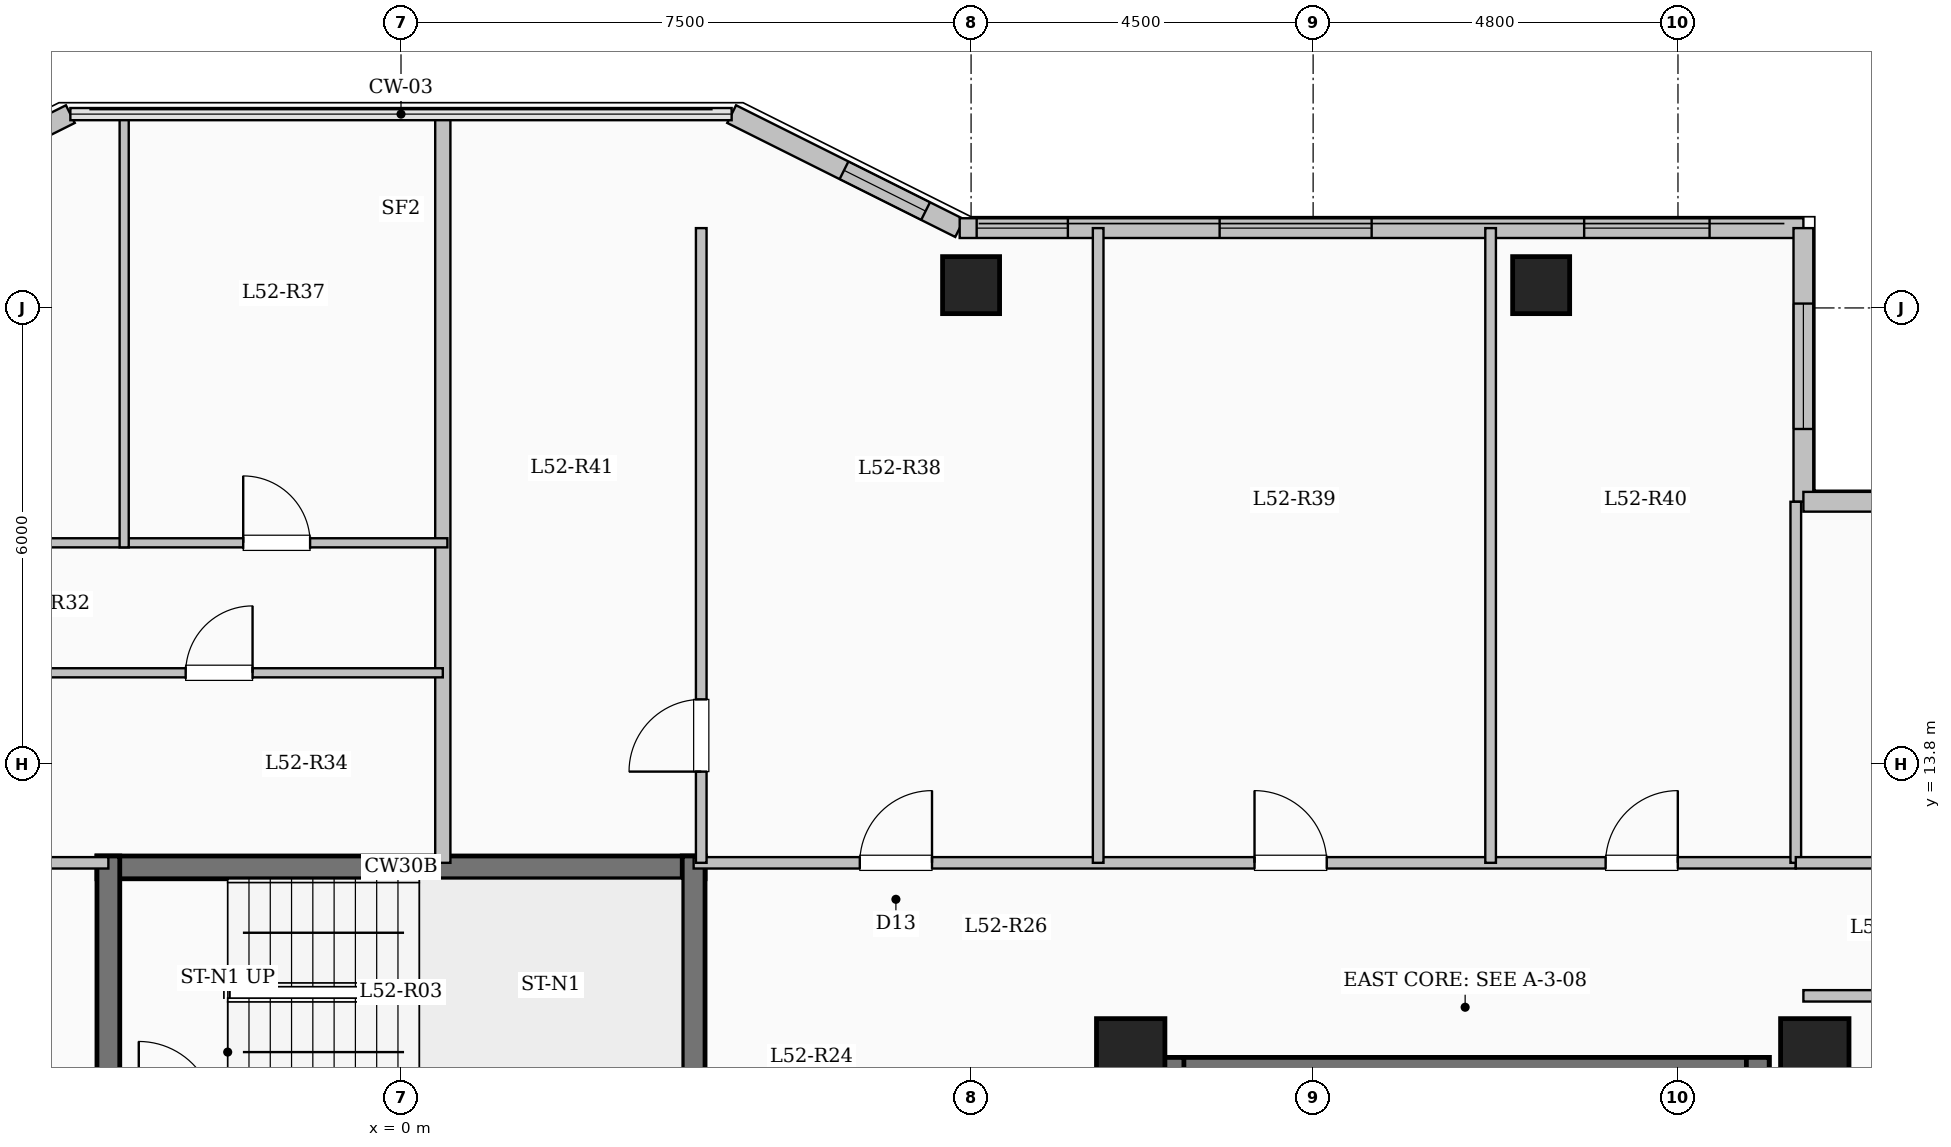
"""IFC4 building model, lengths in metres.
Left out: names, types, materials, properties, quantities, classifications, styles, units other than length and angle.
Written with IfcOpenShell. Run it as: python <this file> out.ifc"""

import sys

from ifc_helpers import new_model, si_unit, direction, frame, frame_2d, origin, origin_2d, place, context, subcontext, project, spatial, rectangle, extrude, element, fill, save


model = new_model("IFC4")
c1 = context("Model", 3, precision=1e-05, world=origin(), true_north=direction((0.0, 1.0)))
c2 = subcontext(c1, "Body", "Model", "MODEL_VIEW")
j1 = project(units=[si_unit("LENGTHUNIT", "METRE"), si_unit("PLANEANGLEUNIT", "RADIAN")], contexts=[c1])
p1 = place(None, origin())
s1 = spatial("IfcSite", under=j1, at=p1, CompositionType="ELEMENT")
p2 = place(p1, origin())
s2 = spatial("IfcBuilding", under=s1, at=p2, CompositionType="ELEMENT")
p3 = place(p2, frame((0.0, 0.0, 193.6)))
s3 = spatial("IfcBuildingStorey", under=s2, at=p3, CompositionType="ELEMENT", Elevation=193.6)
for number, where, z_axis, x_axis in (
    (1, (9.6, 10.0, 0.0), (0.0, 0.0, 1.0), (1.0, 0.0, 0.0)),
    (2, (18.6, 10.0, 0.0), (0.0, 0.0, 1.0), (1.0, 0.0, 0.0)),
):
    element("IfcColumn", number, at=place(p3, frame(where, z_axis=z_axis, x_axis=x_axis)), inside=s3, PredefinedType="COLUMN", context=c2, shape_type="SweptSolid", body=[
        extrude(rectangle(XDim=0.9, YDim=0.9, at=origin_2d()), origin(), (0.0, 0.0, 1.0), 3.35),
    ])
for number, where, z_axis, x_axis in (
    (3, (7.5, 20.1, 0.0), (0.0, 0.0, 1.0), (1.0, 0.0, 0.0)),
    (4, (15.0, 20.1, 0.0), (0.0, 0.0, 1.0), (1.0, 0.0, 0.0)),
):
    element("IfcColumn", number, at=place(p3, frame(where, z_axis=z_axis, x_axis=x_axis)), inside=s3, PredefinedType="COLUMN", context=c2, shape_type="SweptSolid", body=[
        extrude(rectangle(XDim=0.75, YDim=0.75, at=origin_2d()), origin(), (0.0, 0.0, 1.0), 3.35),
    ])
p4 = place(p3, frame((-7.35, 20.85, 0.0), z_axis=(0.0, 0.0, 1.0), x_axis=(0.894427191, 0.4472135955, 0.0)))
e5 = element("IfcWall", 5, at=p4, inside=s3, PredefinedType="SOLIDWALL", context=c2, shape_type="SweptSolid", body=[
    extrude(rectangle(XDim=3.354, YDim=0.26, at=frame_2d((1.677, 0.0))), origin(), (0.0, 0.0, 1.0), 3.1),
])
p5 = place(p4, frame((0.852, 0.0, 0.9)))
e6 = element("IfcOpeningElement", 6, at=p5, cuts=e5, PredefinedType="OPENING", context=c2, shape_type="SweptSolid", body=[
    extrude(rectangle(XDim=1.65, YDim=1.6, at=frame_2d((0.825, 0.8))), frame((0.0, 0.14, 0.0), z_axis=(0.0, -1.0, 0.0), x_axis=(1.0, 0.0, 0.0)), (0.0, 0.0, 1.0), 0.28),
])
p6 = place(p3, frame((4.35, 22.35, 0.0), z_axis=(0.0, 0.0, 1.0), x_axis=(0.894427191, -0.4472135955, 0.0)))
e7 = element("IfcWall", 7, at=p6, inside=s3, PredefinedType="SOLIDWALL", context=c2, shape_type="SweptSolid", body=[
    extrude(rectangle(XDim=3.354, YDim=0.26, at=frame_2d((1.677, 0.0))), origin(), (0.0, 0.0, 1.0), 3.1),
])
p7 = place(p6, frame((1.653, 0.0, 0.95)))
e8 = element("IfcOpeningElement", 8, at=p7, cuts=e7, PredefinedType="OPENING", context=c2, shape_type="SweptSolid", body=[
    extrude(rectangle(XDim=1.2, YDim=1.5, at=frame_2d((0.6, 0.75))), frame((0.0, 0.14, 0.0), z_axis=(0.0, -1.0, 0.0), x_axis=(1.0, 0.0, 0.0)), (0.0, 0.0, 1.0), 0.28),
])
p8 = place(p3, frame((7.35, 20.85, 0.0), z_axis=(0.0, 0.0, 1.0), x_axis=(1.0, 0.0, 0.0)))
e9 = element("IfcWall", 9, at=p8, inside=s3, PredefinedType="SOLIDWALL", context=c2, shape_type="SweptSolid", body=[
    extrude(rectangle(XDim=11.1, YDim=0.26, at=frame_2d((5.55, 0.0))), origin(), (0.0, 0.0, 1.0), 3.1),
])
p9 = place(p8, frame((0.223, 0.0, 0.95)))
e10 = element("IfcOpeningElement", 10, at=p9, cuts=e9, PredefinedType="OPENING", context=c2, shape_type="SweptSolid", body=[
    extrude(rectangle(XDim=1.2, YDim=1.5, at=frame_2d((0.6, 0.75))), frame((0.0, 0.14, 0.0), z_axis=(0.0, -1.0, 0.0), x_axis=(1.0, 0.0, 0.0)), (0.0, 0.0, 1.0), 0.28),
])
p10 = place(p8, frame((3.42, 0.0, 0.9)))
e11 = element("IfcOpeningElement", 11, at=p10, cuts=e9, PredefinedType="OPENING", context=c2, shape_type="SweptSolid", body=[
    extrude(rectangle(XDim=2.0, YDim=1.7, at=frame_2d((1.0, 0.85))), frame((0.0, 0.14, 0.0), z_axis=(0.0, -1.0, 0.0), x_axis=(1.0, 0.0, 0.0)), (0.0, 0.0, 1.0), 0.28),
])
p11 = place(p8, frame((8.216, 0.0, 0.9)))
e12 = element("IfcOpeningElement", 12, at=p11, cuts=e9, PredefinedType="OPENING", context=c2, shape_type="SweptSolid", body=[
    extrude(rectangle(XDim=1.65, YDim=1.6, at=frame_2d((0.825, 0.8))), frame((0.0, 0.14, 0.0), z_axis=(0.0, -1.0, 0.0), x_axis=(1.0, 0.0, 0.0)), (0.0, 0.0, 1.0), 0.28),
])
p12 = place(p3, frame((18.45, 20.85, 0.0), z_axis=(0.0, 0.0, 1.0), x_axis=(0.0, -1.0, 0.0)))
e13 = element("IfcWall", 13, at=p12, inside=s3, PredefinedType="SOLIDWALL", context=c2, shape_type="SweptSolid", body=[
    extrude(rectangle(XDim=3.6, YDim=0.26, at=frame_2d((1.8, 0.0))), origin(), (0.0, 0.0, 1.0), 3.1),
])
p13 = place(p12, frame((0.992, 0.0, 0.9)))
e14 = element("IfcOpeningElement", 14, at=p13, cuts=e13, PredefinedType="OPENING", context=c2, shape_type="SweptSolid", body=[
    extrude(rectangle(XDim=1.65, YDim=1.6, at=frame_2d((0.825, 0.8))), frame((0.0, 0.14, 0.0), z_axis=(0.0, -1.0, 0.0), x_axis=(1.0, 0.0, 0.0)), (0.0, 0.0, 1.0), 0.28),
])
p14 = place(p3, frame((18.45, 17.25, 0.0), z_axis=(0.0, 0.0, 1.0), x_axis=(1.0, 0.0, 0.0)))
e15 = element("IfcWall", 15, at=p14, inside=s3, PredefinedType="SOLIDWALL", context=c2, shape_type="SweptSolid", body=[
    extrude(rectangle(XDim=5.1, YDim=0.26, at=frame_2d((2.55, 0.0))), origin(), (0.0, 0.0, 1.0), 3.1),
])
p15 = place(p14, frame((1.525, 0.0, 0.9)))
e16 = element("IfcOpeningElement", 16, at=p15, cuts=e15, PredefinedType="OPENING", context=c2, shape_type="SweptSolid", body=[
    extrude(rectangle(XDim=2.0, YDim=1.7, at=frame_2d((1.0, 0.85))), frame((0.0, 0.14, 0.0), z_axis=(0.0, -1.0, 0.0), x_axis=(1.0, 0.0, 0.0)), (0.0, 0.0, 1.0), 0.28),
])
p16 = place(p3, frame((10.0, 9.79, 0.0), z_axis=(0.0, 0.0, 1.0), x_axis=(1.0, 0.0, 0.0)))
e17 = element("IfcWall", 17, at=p16, inside=s3, PredefinedType="SHEAR", context=c2, shape_type="SweptSolid", body=[
    extrude(rectangle(XDim=8.0, YDim=0.3, at=frame_2d((4.0, 0.0))), origin(), (0.0, 0.0, 1.0), 3.35),
])
for number, where, z_axis, x_axis in (
    (18, (10.15, 6.35, 0.0), (0.0, 0.0, 1.0), (0.0, 1.0, 0.0)),
    (19, (17.85, 6.35, 0.0), (0.0, 0.0, 1.0), (0.0, 1.0, 0.0)),
):
    element("IfcWall", number, at=place(p3, frame(where, z_axis=z_axis, x_axis=x_axis)), inside=s3, PredefinedType="SHEAR", context=c2, shape_type="SweptSolid", body=[
        extrude(rectangle(XDim=3.59, YDim=0.3, at=frame_2d((1.795, 0.0))), origin(), (0.0, 0.0, 1.0), 3.35),
    ])
p17 = place(p3, frame((-4.0, 12.44, 0.0), z_axis=(0.0, 0.0, 1.0), x_axis=(1.0, 0.0, 0.0)))
e20 = element("IfcWall", 20, at=p17, inside=s3, PredefinedType="SHEAR", context=c2, shape_type="SweptSolid", body=[
    extrude(rectangle(XDim=8.0, YDim=0.3, at=frame_2d((4.0, 0.0))), origin(), (0.0, 0.0, 1.0), 3.35),
])
for number, where, z_axis, x_axis in (
    (21, (-3.85, 9.0, 0.0), (0.0, 0.0, 1.0), (0.0, 1.0, 0.0)),
    (22, (3.85, 9.0, 0.0), (0.0, 0.0, 1.0), (0.0, 1.0, 0.0)),
):
    element("IfcWall", number, at=place(p3, frame(where, z_axis=z_axis, x_axis=x_axis)), inside=s3, PredefinedType="SHEAR", context=c2, shape_type="SweptSolid", body=[
        extrude(rectangle(XDim=3.59, YDim=0.3, at=frame_2d((1.795, 0.0))), origin(), (0.0, 0.0, 1.0), 3.35),
    ])
p18 = place(p3, frame((-18.35, 12.5, 0.0), z_axis=(0.0, 0.0, 1.0), x_axis=(1.0, 0.0, 0.0)))
e23 = element("IfcWall", 23, at=p18, inside=s3, PredefinedType="PARTITIONING", context=c2, shape_type="SweptSolid", body=[
    extrude(rectangle(XDim=14.5, YDim=0.15, at=frame_2d((7.25, 0.0))), origin(), (0.0, 0.0, 1.0), 3.1),
])
p19 = place(p18, frame((0.7, 0.0, 0.0)))
e24 = element("IfcOpeningElement", 24, at=p19, cuts=e23, PredefinedType="OPENING", context=c2, shape_type="SweptSolid", body=[
    extrude(rectangle(XDim=0.96, YDim=2.15, at=frame_2d((0.48, 1.075))), frame((0.0, 0.085, 0.0), z_axis=(0.0, -1.0, 0.0), x_axis=(1.0, 0.0, 0.0)), (0.0, 0.0, 1.0), 0.17),
])
p20 = place(p3, frame((3.85, 12.5, 0.0), z_axis=(0.0, 0.0, 1.0), x_axis=(1.0, 0.0, 0.0)))
e25 = element("IfcWall", 25, at=p20, inside=s3, PredefinedType="PARTITIONING", context=c2, shape_type="SweptSolid", body=[
    extrude(rectangle(XDim=14.5, YDim=0.15, at=frame_2d((7.25, 0.0))), origin(), (0.0, 0.0, 1.0), 3.1),
])
p21 = place(p20, frame((2.186, 0.0, 0.0)))
e26 = element("IfcOpeningElement", 26, at=p21, cuts=e25, PredefinedType="OPENING", context=c2, shape_type="SweptSolid", body=[
    extrude(rectangle(XDim=0.95, YDim=2.15, at=frame_2d((0.475, 1.075))), frame((0.0, 0.085, 0.0), z_axis=(0.0, -1.0, 0.0), x_axis=(1.0, 0.0, 0.0)), (0.0, 0.0, 1.0), 0.17),
])
p22 = place(p20, frame((7.379, 0.0, 0.0)))
e27 = element("IfcOpeningElement", 27, at=p22, cuts=e25, PredefinedType="OPENING", context=c2, shape_type="SweptSolid", body=[
    extrude(rectangle(XDim=0.95, YDim=2.15, at=frame_2d((0.475, 1.075))), frame((0.0, 0.085, 0.0), z_axis=(0.0, -1.0, 0.0), x_axis=(1.0, 0.0, 0.0)), (0.0, 0.0, 1.0), 0.17),
])
p23 = place(p20, frame((11.998, 0.0, 0.0)))
e28 = element("IfcOpeningElement", 28, at=p23, cuts=e25, PredefinedType="OPENING", context=c2, shape_type="SweptSolid", body=[
    extrude(rectangle(XDim=0.95, YDim=2.15, at=frame_2d((0.475, 1.075))), frame((0.0, 0.085, 0.0), z_axis=(0.0, -1.0, 0.0), x_axis=(1.0, 0.0, 0.0)), (0.0, 0.0, 1.0), 0.17),
])
p24 = place(p3, frame((0.55, 12.5, 0.0), z_axis=(0.0, 0.0, 1.0), x_axis=(0.0, 1.0, 0.0)))
e29 = element("IfcWall", 29, at=p24, inside=s3, PredefinedType="SOLIDWALL", context=c2, shape_type="SweptSolid", body=[
    extrude(rectangle(XDim=9.88, YDim=0.2, at=frame_2d((4.94, 0.0))), origin(), (0.0, 0.0, 1.0), 3.1),
])
p25 = place(p3, frame((-5.336, 15.0, 0.0), z_axis=(0.0, 0.0, 1.0), x_axis=(1.0, 0.0, 0.0)))
e30 = element("IfcWall", 30, at=p25, inside=s3, PredefinedType="PARTITIONING", context=c2, shape_type="SweptSolid", body=[
    extrude(rectangle(XDim=5.886, YDim=0.12, at=frame_2d((2.943, 0.0))), origin(), (0.0, 0.0, 1.0), 3.1),
])
p26 = place(p25, frame((2.503, 0.0, 0.0)))
e31 = element("IfcOpeningElement", 31, at=p26, cuts=e30, PredefinedType="OPENING", context=c2, shape_type="SweptSolid", body=[
    extrude(rectangle(XDim=0.88, YDim=2.1, at=frame_2d((0.44, 1.05))), frame((0.0, 0.07, 0.0), z_axis=(0.0, -1.0, 0.0), x_axis=(1.0, 0.0, 0.0)), (0.0, 0.0, 1.0), 0.14),
])
p27 = place(p3, frame((-11.965, 16.71, 0.0), z_axis=(0.0, 0.0, 1.0), x_axis=(1.0, 0.0, 0.0)))
e32 = element("IfcWall", 32, at=p27, inside=s3, PredefinedType="PARTITIONING", context=c2, shape_type="SweptSolid", body=[
    extrude(rectangle(XDim=12.575, YDim=0.12, at=frame_2d((6.288, 0.0))), origin(), (0.0, 0.0, 1.0), 2.725),
])
p28 = place(p27, frame((1.626, 0.0, 0.0)))
e33 = element("IfcOpeningElement", 33, at=p28, cuts=e32, PredefinedType="OPENING", context=c2, shape_type="SweptSolid", body=[
    extrude(rectangle(XDim=0.88, YDim=2.1, at=frame_2d((0.44, 1.05))), frame((0.0, 0.07, 0.0), z_axis=(0.0, -1.0, 0.0), x_axis=(1.0, 0.0, 0.0)), (0.0, 0.0, 1.0), 0.14),
])
p29 = place(p27, frame((5.758, 0.0, 0.0)))
e34 = element("IfcOpeningElement", 34, at=p29, cuts=e32, PredefinedType="OPENING", context=c2, shape_type="SweptSolid", body=[
    extrude(rectangle(XDim=0.88, YDim=2.1, at=frame_2d((0.44, 1.05))), frame((0.0, 0.07, 0.0), z_axis=(0.0, -1.0, 0.0), x_axis=(1.0, 0.0, 0.0)), (0.0, 0.0, 1.0), 0.14),
])
p30 = place(p27, frame((9.889, 0.0, 0.0)))
e35 = element("IfcOpeningElement", 35, at=p30, cuts=e32, PredefinedType="OPENING", context=c2, shape_type="SweptSolid", body=[
    extrude(rectangle(XDim=0.88, YDim=2.1, at=frame_2d((0.44, 1.05))), frame((0.0, 0.07, 0.0), z_axis=(0.0, -1.0, 0.0), x_axis=(1.0, 0.0, 0.0)), (0.0, 0.0, 1.0), 0.14),
])
p31 = place(p3, frame((-3.642, 16.65, 0.0), z_axis=(0.0, 0.0, 1.0), x_axis=(0.0, 1.0, 0.0)))
e36 = element("IfcWall", 36, at=p31, inside=s3, PredefinedType="PARTITIONING", context=c2, shape_type="SweptSolid", body=[
    extrude(rectangle(XDim=5.73, YDim=0.12, at=frame_2d((2.865, 0.0))), origin(), (0.0, 0.0, 1.0), 3.1),
])
p32 = place(p3, frame((3.95, 12.5, 0.0), z_axis=(0.0, 0.0, 1.0), x_axis=(0.0, 1.0, 0.0)))
e37 = element("IfcWall", 37, at=p32, inside=s3, PredefinedType="PARTITIONING", context=c2, shape_type="SweptSolid", body=[
    extrude(rectangle(XDim=8.35, YDim=0.14, at=frame_2d((4.175, 0.0))), origin(), (0.0, 0.0, 1.0), 3.1),
])
p33 = place(p32, frame((1.2, 0.0, 0.0)))
e38 = element("IfcOpeningElement", 38, at=p33, cuts=e37, PredefinedType="OPENING", context=c2, shape_type="SweptSolid", body=[
    extrude(rectangle(XDim=0.95, YDim=2.15, at=frame_2d((0.475, 1.075))), frame((0.0, 0.08, 0.0), z_axis=(0.0, -1.0, 0.0), x_axis=(1.0, 0.0, 0.0)), (0.0, 0.0, 1.0), 0.16),
])
for number, where, z_axis, x_axis in (
    (39, (9.172, 12.5, 0.0), (0.0, 0.0, 1.0), (0.0, 1.0, 0.0)),
    (40, (14.335, 12.5, 0.0), (0.0, 0.0, 1.0), (0.0, 1.0, 0.0)),
):
    element("IfcWall", number, at=place(p3, frame(where, z_axis=z_axis, x_axis=x_axis)), inside=s3, PredefinedType="PARTITIONING", context=c2, shape_type="SweptSolid", body=[
        extrude(rectangle(XDim=8.35, YDim=0.14, at=frame_2d((4.175, 0.0))), origin(), (0.0, 0.0, 1.0), 3.1),
    ])
p34 = place(p3, frame((18.45, 10.75, 0.0), z_axis=(0.0, 0.0, 1.0), x_axis=(1.0, 0.0, 0.0)))
e41 = element("IfcWall", 41, at=p34, inside=s3, PredefinedType="PARTITIONING", context=c2, shape_type="SweptSolid", body=[
    extrude(rectangle(XDim=5.13, YDim=0.15, at=frame_2d((2.565, 0.0))), origin(), (0.0, 0.0, 1.0), 3.1),
])
p35 = place(p3, frame((18.35, 12.5, 0.0), z_axis=(0.0, 0.0, 1.0), x_axis=(0.0, 1.0, 0.0)))
e42 = element("IfcWall", 42, at=p35, inside=s3, PredefinedType="PARTITIONING", context=c2, shape_type="SweptSolid", body=[
    extrude(rectangle(XDim=4.75, YDim=0.14, at=frame_2d((2.375, 0.0))), origin(), (0.0, 0.0, 1.0), 3.1),
])
p36 = place(p3, frame((18.35, 12.5, 0.0), z_axis=(0.0, 0.0, 1.0), x_axis=(1.0, 0.0, 0.0)))
e43 = element("IfcWall", 43, at=p36, inside=s3, PredefinedType="PARTITIONING", context=c2, shape_type="SweptSolid", body=[
    extrude(rectangle(XDim=5.23, YDim=0.15, at=frame_2d((2.615, 0.0))), origin(), (0.0, 0.0, 1.0), 3.1),
])
p37 = place(p36, frame((2.14, 0.0, 0.0)))
e44 = element("IfcOpeningElement", 44, at=p37, cuts=e43, PredefinedType="OPENING", context=c2, shape_type="SweptSolid", body=[
    extrude(rectangle(XDim=0.95, YDim=2.15, at=frame_2d((0.475, 1.075))), frame((0.0, 0.085, 0.0), z_axis=(0.0, -1.0, 0.0), x_axis=(1.0, 0.0, 0.0)), (0.0, 0.0, 1.0), 0.17),
])
p38 = place(p7, origin())
e45 = element("IfcWindow", 45, at=p38, inside=s3, PartitioningType="SINGLE_PANEL", PredefinedType="WINDOW", context=c2, shape_type="SweptSolid", body=[
    extrude(rectangle(XDim=1.2, YDim=1.5, at=frame_2d((0.6, 0.75))), frame((0.0, 0.03, 0.0), z_axis=(0.0, -1.0, 0.0), x_axis=(1.0, 0.0, 0.0)), (0.0, 0.0, 1.0), 0.06),
])
fill(e8, e45)
p39 = place(p9, origin())
e46 = element("IfcWindow", 46, at=p39, inside=s3, PartitioningType="SINGLE_PANEL", PredefinedType="WINDOW", context=c2, shape_type="SweptSolid", body=[
    extrude(rectangle(XDim=1.2, YDim=1.5, at=frame_2d((0.6, 0.75))), frame((0.0, 0.03, 0.0), z_axis=(0.0, -1.0, 0.0), x_axis=(1.0, 0.0, 0.0)), (0.0, 0.0, 1.0), 0.06),
])
fill(e10, e46)
p40 = place(p10, origin())
e47 = element("IfcWindow", 47, at=p40, inside=s3, PartitioningType="SINGLE_PANEL", PredefinedType="WINDOW", context=c2, shape_type="SweptSolid", body=[
    extrude(rectangle(XDim=2.0, YDim=1.7, at=frame_2d((1.0, 0.85))), frame((0.0, 0.03, 0.0), z_axis=(0.0, -1.0, 0.0), x_axis=(1.0, 0.0, 0.0)), (0.0, 0.0, 1.0), 0.06),
])
fill(e11, e47)
p41 = place(p11, origin())
e48 = element("IfcWindow", 48, at=p41, inside=s3, PartitioningType="SINGLE_PANEL", PredefinedType="WINDOW", context=c2, shape_type="SweptSolid", body=[
    extrude(rectangle(XDim=1.65, YDim=1.6, at=frame_2d((0.825, 0.8))), frame((0.0, 0.03, 0.0), z_axis=(0.0, -1.0, 0.0), x_axis=(1.0, 0.0, 0.0)), (0.0, 0.0, 1.0), 0.06),
])
fill(e12, e48)
p42 = place(p13, origin())
e49 = element("IfcWindow", 49, at=p42, inside=s3, PartitioningType="SINGLE_PANEL", PredefinedType="WINDOW", context=c2, shape_type="SweptSolid", body=[
    extrude(rectangle(XDim=1.65, YDim=1.6, at=frame_2d((0.825, 0.8))), frame((0.0, 0.03, 0.0), z_axis=(0.0, -1.0, 0.0), x_axis=(1.0, 0.0, 0.0)), (0.0, 0.0, 1.0), 0.06),
])
fill(e14, e49)
p43 = place(p26, origin())
e50 = element("IfcDoor", 50, at=p43, inside=s3, OperationType="SINGLE_SWING_RIGHT", PredefinedType="DOOR", context=c2, shape_type="SweptSolid", body=[
    extrude(rectangle(XDim=0.88, YDim=2.1, at=frame_2d((0.44, 1.05))), frame((0.0, 0.025, 0.0), z_axis=(0.0, -1.0, 0.0), x_axis=(1.0, 0.0, 0.0)), (0.0, 0.0, 1.0), 0.05),
])
fill(e31, e50)
p44 = place(p30, origin())
e51 = element("IfcDoor", 51, at=p44, inside=s3, OperationType="SINGLE_SWING_LEFT", PredefinedType="DOOR", context=c2, shape_type="SweptSolid", body=[
    extrude(rectangle(XDim=0.88, YDim=2.1, at=frame_2d((0.44, 1.05))), frame((0.0, 0.025, 0.0), z_axis=(0.0, -1.0, 0.0), x_axis=(1.0, 0.0, 0.0)), (0.0, 0.0, 1.0), 0.05),
])
fill(e35, e51)
p45 = place(p21, origin())
e52 = element("IfcDoor", 52, at=p45, inside=s3, OperationType="SINGLE_SWING_RIGHT", PredefinedType="DOOR", context=c2, shape_type="SweptSolid", body=[
    extrude(rectangle(XDim=0.95, YDim=2.15, at=frame_2d((0.475, 1.075))), frame((0.0, 0.025, 0.0), z_axis=(0.0, -1.0, 0.0), x_axis=(1.0, 0.0, 0.0)), (0.0, 0.0, 1.0), 0.05),
])
fill(e26, e52)
p46 = place(p22, origin())
e53 = element("IfcDoor", 53, at=p46, inside=s3, OperationType="SINGLE_SWING_LEFT", PredefinedType="DOOR", context=c2, shape_type="SweptSolid", body=[
    extrude(rectangle(XDim=0.95, YDim=2.15, at=frame_2d((0.475, 1.075))), frame((0.0, 0.025, 0.0), z_axis=(0.0, -1.0, 0.0), x_axis=(1.0, 0.0, 0.0)), (0.0, 0.0, 1.0), 0.05),
])
fill(e27, e53)
p47 = place(p23, origin())
e54 = element("IfcDoor", 54, at=p47, inside=s3, OperationType="SINGLE_SWING_RIGHT", PredefinedType="DOOR", context=c2, shape_type="SweptSolid", body=[
    extrude(rectangle(XDim=0.95, YDim=2.15, at=frame_2d((0.475, 1.075))), frame((0.0, 0.025, 0.0), z_axis=(0.0, -1.0, 0.0), x_axis=(1.0, 0.0, 0.0)), (0.0, 0.0, 1.0), 0.05),
])
fill(e28, e54)
p48 = place(p33, origin())
e55 = element("IfcDoor", 55, at=p48, inside=s3, OperationType="SINGLE_SWING_LEFT", PredefinedType="DOOR", context=c2, shape_type="SweptSolid", body=[
    extrude(rectangle(XDim=0.95, YDim=2.15, at=frame_2d((0.475, 1.075))), frame((0.0, 0.025, 0.0), z_axis=(0.0, -1.0, 0.0), x_axis=(1.0, 0.0, 0.0)), (0.0, 0.0, 1.0), 0.05),
])
fill(e38, e55)
save(model, sys.argv[1])
